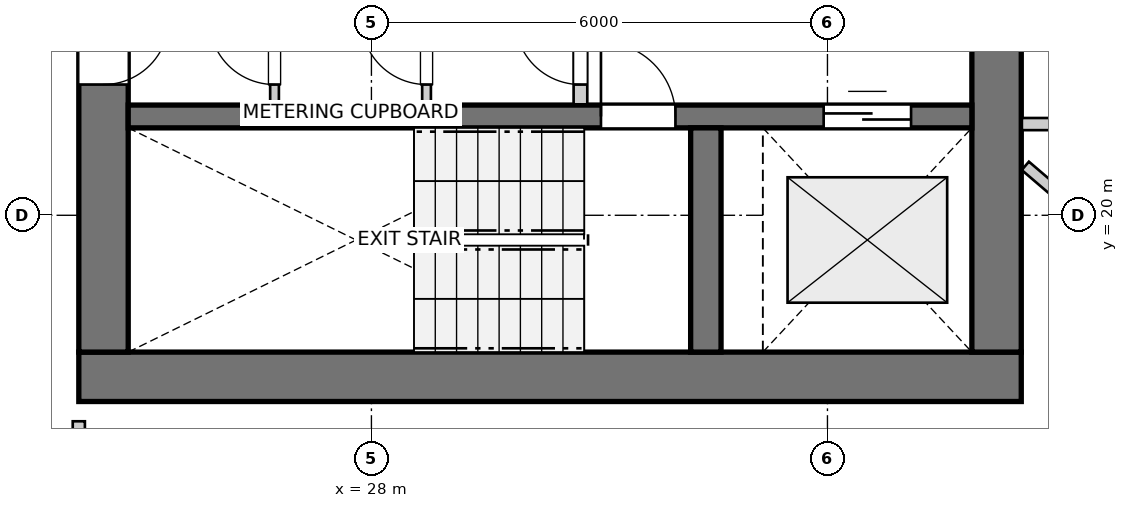
"""IFC4 building model, lengths in metres.
Left out: names, types, materials, properties, quantities, classifications, styles, units other than length and angle.
Written with IfcOpenShell. Run it as: python <this file> out.ifc"""

import sys

from ifc_helpers import new_model, si_unit, direction, frame, frame_2d, origin, place, context, subcontext, project, spatial, rectangle, extrude, source, transform, mapped, element, fill, save


model = new_model("IFC4")
c1 = context("Model", 3, precision=1e-05, world=origin(), true_north=direction((0.0, 1.0)))
c2 = subcontext(c1, "Body", "Model", "MODEL_VIEW")
j1 = project(units=[si_unit("LENGTHUNIT", "METRE"), si_unit("PLANEANGLEUNIT", "RADIAN")], contexts=[c1])
p1 = place(None, origin())
s1 = spatial("IfcSite", under=j1, at=p1, CompositionType="ELEMENT")
p2 = place(p1, origin())
s2 = spatial("IfcBuilding", under=s1, at=p2, CompositionType="ELEMENT")
p3 = place(p2, frame((0.0, 0.0, 187.4)))
s3 = spatial("IfcBuildingStorey", under=s2, at=p3, CompositionType="ELEMENT", Elevation=187.4)
p4 = place(p3, frame((24.15, 17.875, 0.0), z_axis=(0.0, 0.0, 1.0), x_axis=(1.0, 0.0, 0.0)))
e1 = element("IfcWall", 1, at=p4, inside=s3, PredefinedType="SHEAR", context=c2, shape_type="SweptSolid", body=[
    extrude(rectangle(XDim=12.4, YDim=0.65, at=frame_2d((6.2, 0.0))), origin(), (0.0, 0.0, 1.0), 2.9),
])
p5 = place(p3, frame((24.475, 33.8, 0.0), z_axis=(0.0, 0.0, 1.0), x_axis=(0.0, -1.0, 0.0)))
e2 = element("IfcWall", 2, at=p5, inside=s3, PredefinedType="SHEAR", context=c2, shape_type="SweptSolid", body=[
    extrude(rectangle(XDim=15.6, YDim=0.65, at=frame_2d((7.8, 0.0))), origin(), (0.0, 0.0, 1.0), 2.9),
])
p6 = place(p5, frame((7.05, 0.0, 0.0)))
e3 = element("IfcOpeningElement", 3, at=p6, cuts=e2, PredefinedType="OPENING", context=c2, shape_type="SweptSolid", body=[
    extrude(rectangle(XDim=1.5, YDim=2.15, at=frame_2d((0.75, 1.075))), frame((0.0, 0.335, 0.0), z_axis=(0.0, -1.0, 0.0), x_axis=(1.0, 0.0, 0.0)), (0.0, 0.0, 1.0), 0.67),
])
p7 = place(p5, frame((3.52, 0.0, 0.0)))
e4 = element("IfcOpeningElement", 4, at=p7, cuts=e2, PredefinedType="OPENING", context=c2, shape_type="SweptSolid", body=[
    extrude(rectangle(XDim=0.86, YDim=2.05, at=frame_2d((0.43, 1.025))), frame((0.0, 0.335, 0.0), z_axis=(0.0, -1.0, 0.0), x_axis=(1.0, 0.0, 0.0)), (0.0, 0.0, 1.0), 0.67),
])
p8 = place(p5, frame((11.22, 0.0, 0.0)))
e5 = element("IfcOpeningElement", 5, at=p8, cuts=e2, PredefinedType="OPENING", context=c2, shape_type="SweptSolid", body=[
    extrude(rectangle(XDim=0.86, YDim=2.05, at=frame_2d((0.43, 1.025))), frame((0.0, 0.335, 0.0), z_axis=(0.0, -1.0, 0.0), x_axis=(1.0, 0.0, 0.0)), (0.0, 0.0, 1.0), 0.67),
])
p9 = place(p3, frame((36.225, 18.2, 0.0), z_axis=(0.0, 0.0, 1.0), x_axis=(0.0, 1.0, 0.0)))
e6 = element("IfcWall", 6, at=p9, inside=s3, PredefinedType="SHEAR", context=c2, shape_type="SweptSolid", body=[
    extrude(rectangle(XDim=15.6, YDim=0.65, at=frame_2d((7.8, 0.0))), origin(), (0.0, 0.0, 1.0), 2.9),
])
p10 = place(p9, frame((4.25, 0.0, 0.0)))
e7 = element("IfcOpeningElement", 7, at=p10, cuts=e6, PredefinedType="OPENING", context=c2, shape_type="SweptSolid", body=[
    extrude(rectangle(XDim=1.1, YDim=2.15, at=frame_2d((0.55, 1.075))), frame((0.0, 0.335, 0.0), z_axis=(0.0, -1.0, 0.0), x_axis=(1.0, 0.0, 0.0)), (0.0, 0.0, 1.0), 0.67),
])
p11 = place(p9, frame((10.25, 0.0, 0.0)))
e8 = element("IfcOpeningElement", 8, at=p11, cuts=e6, PredefinedType="OPENING", context=c2, shape_type="SweptSolid", body=[
    extrude(rectangle(XDim=1.1, YDim=2.15, at=frame_2d((0.55, 1.075))), frame((0.0, 0.335, 0.0), z_axis=(0.0, -1.0, 0.0), x_axis=(1.0, 0.0, 0.0)), (0.0, 0.0, 1.0), 0.67),
])
p12 = place(p3, frame((24.8, 21.3, 0.0), z_axis=(0.0, 0.0, 1.0), x_axis=(1.0, 0.0, 0.0)))
e9 = element("IfcWall", 9, at=p12, inside=s3, PredefinedType="SHEAR", context=c2, shape_type="SweptSolid", body=[
    extrude(rectangle(XDim=11.1, YDim=0.3, at=frame_2d((5.55, 0.0))), origin(), (0.0, 0.0, 1.0), 2.9),
])
p13 = place(p12, frame((6.22, 0.0, 0.0)))
e10 = element("IfcOpeningElement", 10, at=p13, cuts=e9, PredefinedType="OPENING", context=c2, shape_type="SweptSolid", body=[
    extrude(rectangle(XDim=0.98, YDim=2.15, at=frame_2d((0.49, 1.075))), frame((0.0, 0.16, 0.0), z_axis=(0.0, -1.0, 0.0), x_axis=(1.0, 0.0, 0.0)), (0.0, 0.0, 1.0), 0.32),
])
p14 = place(p12, frame((9.15, 0.0, 0.0)))
e11 = element("IfcOpeningElement", 11, at=p14, cuts=e9, PredefinedType="OPENING", context=c2, shape_type="SweptSolid", body=[
    extrude(rectangle(XDim=1.15, YDim=2.15, at=frame_2d((0.575, 1.075))), frame((0.0, 0.16, 0.0), z_axis=(0.0, -1.0, 0.0), x_axis=(1.0, 0.0, 0.0)), (0.0, 0.0, 1.0), 0.32),
])
p15 = place(p3, frame((32.4, 18.2, 0.0), z_axis=(0.0, 0.0, 1.0), x_axis=(0.0, 1.0, 0.0)))
e12 = element("IfcWall", 12, at=p15, inside=s3, PredefinedType="SHEAR", context=c2, shape_type="SweptSolid", body=[
    extrude(rectangle(XDim=2.95, YDim=0.4, at=frame_2d((1.475, 0.0))), origin(), (0.0, 0.0, 1.0), 2.9),
])
p16 = place(p3, frame((30.75, 21.46, 0.0), z_axis=(0.0, 0.0, 1.0), x_axis=(0.0, 1.0, 0.0)))
e13 = element("IfcWall", 13, at=p16, inside=s3, PredefinedType="PARTITIONING", context=c2, shape_type="SweptSolid", body=[
    extrude(rectangle(XDim=3.11, YDim=0.18, at=frame_2d((1.555, 0.0))), origin(), (0.0, 0.0, 1.0), 2.9),
])
p17 = place(p16, frame((0.26, 0.0, 0.0)))
e14 = element("IfcOpeningElement", 14, at=p17, cuts=e13, PredefinedType="OPENING", context=c2, shape_type="SweptSolid", body=[
    extrude(rectangle(XDim=0.86, YDim=2.05, at=frame_2d((0.43, 1.025))), frame((0.0, 0.1, 0.0), z_axis=(0.0, -1.0, 0.0), x_axis=(1.0, 0.0, 0.0)), (0.0, 0.0, 1.0), 0.2),
])
p18 = place(p3, frame((26.725, 21.46, 0.0), z_axis=(0.0, 0.0, 1.0), x_axis=(0.0, 1.0, 0.0)))
e15 = element("IfcWall", 15, at=p18, inside=s3, PredefinedType="PARTITIONING", context=c2, shape_type="SweptSolid", body=[
    extrude(rectangle(XDim=1.38, YDim=0.115, at=frame_2d((0.69, 0.0))), origin(), (0.0, 0.0, 1.0), 2.9),
])
p19 = place(p18, frame((0.26, 0.0, 0.0)))
e16 = element("IfcOpeningElement", 16, at=p19, cuts=e15, PredefinedType="OPENING", context=c2, shape_type="SweptSolid", body=[
    extrude(rectangle(XDim=0.86, YDim=2.05, at=frame_2d((0.43, 1.025))), frame((0.0, 0.067, 0.0), z_axis=(0.0, -1.0, 0.0), x_axis=(1.0, 0.0, 0.0)), (0.0, 0.0, 1.0), 0.135),
])
p20 = place(p3, frame((28.725, 21.46, 0.0), z_axis=(0.0, 0.0, 1.0), x_axis=(0.0, 1.0, 0.0)))
e17 = element("IfcWall", 17, at=p20, inside=s3, PredefinedType="PARTITIONING", context=c2, shape_type="SweptSolid", body=[
    extrude(rectangle(XDim=1.38, YDim=0.115, at=frame_2d((0.69, 0.0))), origin(), (0.0, 0.0, 1.0), 2.9),
])
p21 = place(p20, frame((0.26, 0.0, 0.0)))
e18 = element("IfcOpeningElement", 18, at=p21, cuts=e17, PredefinedType="OPENING", context=c2, shape_type="SweptSolid", body=[
    extrude(rectangle(XDim=0.86, YDim=2.05, at=frame_2d((0.43, 1.025))), frame((0.0, 0.067, 0.0), z_axis=(0.0, -1.0, 0.0), x_axis=(1.0, 0.0, 0.0)), (0.0, 0.0, 1.0), 0.135),
])
p22 = place(p3, frame((24.15, 17.29, 0.0), z_axis=(0.0, 0.0, 1.0), x_axis=(0.0, -1.0, 0.0)))
e19 = element("IfcWall", 19, at=p22, inside=s3, PredefinedType="PARTITIONING", context=c2, shape_type="SweptSolid", body=[
    extrude(rectangle(XDim=3.593, YDim=0.16, at=frame_2d((1.796, 0.0))), origin(), (0.0, 0.0, 1.0), 2.9),
])
p23 = place(p22, frame((1.159, 0.0, 0.0)))
e20 = element("IfcOpeningElement", 20, at=p23, cuts=e19, PredefinedType="OPENING", context=c2, shape_type="SweptSolid", body=[
    extrude(rectangle(XDim=1.3, YDim=2.1, at=frame_2d((0.65, 1.05))), frame((0.0, 0.09, 0.0), z_axis=(0.0, -1.0, 0.0), x_axis=(1.0, 0.0, 0.0)), (0.0, 0.0, 1.0), 0.18),
])
p24 = place(p3, frame((38.33, 21.2, 0.0), z_axis=(0.0, 0.0, 1.0), x_axis=(-1.0, 0.0, 0.0)))
e21 = element("IfcWall", 21, at=p24, inside=s3, PredefinedType="PARTITIONING", context=c2, shape_type="SweptSolid", body=[
    extrude(rectangle(XDim=1.772, YDim=0.16, at=frame_2d((0.886, 0.0))), origin(), (0.0, 0.0, 1.0), 2.9),
])
p25 = place(p24, frame((0.41, 0.0, 0.0)))
e22 = element("IfcOpeningElement", 22, at=p25, cuts=e21, PredefinedType="OPENING", context=c2, shape_type="SweptSolid", body=[
    extrude(rectangle(XDim=0.96, YDim=2.1, at=frame_2d((0.48, 1.05))), frame((0.0, 0.09, 0.0), z_axis=(0.0, -1.0, 0.0), x_axis=(1.0, 0.0, 0.0)), (0.0, 0.0, 1.0), 0.18),
])
p26 = place(p3, frame((36.603, 20.65, 0.0), z_axis=(0.0, 0.0, 1.0), x_axis=(0.759924803985, -0.650010993975, 0.0)))
e23 = element("IfcWall", 23, at=p26, inside=s3, PredefinedType="PARTITIONING", context=c2, shape_type="SweptSolid", body=[
    extrude(rectangle(XDim=7.294, YDim=0.145, at=frame_2d((3.647, 0.0))), origin(), (0.0, 0.0, 1.0), 2.9),
])
m1 = source(origin(), c2, "Body", "SweptSolid", [
    extrude(rectangle(XDim=0.98, YDim=2.15, at=frame_2d((0.49, 1.075))), frame((0.0, 0.025, 0.0), z_axis=(0.0, -1.0, 0.0), x_axis=(1.0, 0.0, 0.0)), (0.0, 0.0, 1.0), 0.05),
])
p27 = place(p13, origin())
e24 = element("IfcDoor", 24, at=p27, inside=s3, OperationType="SINGLE_SWING_LEFT", PredefinedType="DOOR", context=c2, shape_type="MappedRepresentation", body=[
    mapped(m1, transform((0.0, 0.0, 0.0), x_axis=(1.0, 0.0, 0.0), y_axis=(0.0, 1.0, 0.0), z_axis=(0.0, 0.0, 1.0), scale=1.0)),
])
fill(e10, e24)
m2 = source(origin(), c2, "Body", "SweptSolid", [
    extrude(rectangle(XDim=1.15, YDim=2.15, at=frame_2d((0.575, 1.075))), frame((0.0, 0.025, 0.0), z_axis=(0.0, -1.0, 0.0), x_axis=(1.0, 0.0, 0.0)), (0.0, 0.0, 1.0), 0.05),
])
p28 = place(p14, origin())
e25 = element("IfcDoor", 25, at=p28, inside=s3, OperationType="DOUBLE_DOOR_SLIDING", PredefinedType="DOOR", context=c2, shape_type="MappedRepresentation", body=[
    mapped(m2, transform((0.0, 0.0, 0.0), x_axis=(1.0, 0.0, 0.0), y_axis=(0.0, 1.0, 0.0), z_axis=(0.0, 0.0, 1.0), scale=1.0)),
])
fill(e11, e25)
m3 = source(origin(), c2, "Body", "SweptSolid", [
    extrude(rectangle(XDim=0.86, YDim=2.05, at=frame_2d((0.43, 1.025))), frame((0.0, 0.025, 0.0), z_axis=(0.0, -1.0, 0.0), x_axis=(1.0, 0.0, 0.0)), (0.0, 0.0, 1.0), 0.05),
])
p29 = place(p8, origin())
e26 = element("IfcDoor", 26, at=p29, inside=s3, OperationType="SINGLE_SWING_LEFT", PredefinedType="DOOR", context=c2, shape_type="MappedRepresentation", body=[
    mapped(m3, transform((0.0, 0.0, 0.0), x_axis=(1.0, 0.0, 0.0), y_axis=(0.0, 1.0, 0.0), z_axis=(0.0, 0.0, 1.0), scale=1.0)),
])
fill(e5, e26)
p30 = place(p17, origin())
e27 = element("IfcDoor", 27, at=p30, inside=s3, OperationType="SINGLE_SWING_RIGHT", PredefinedType="DOOR", context=c2, shape_type="MappedRepresentation", body=[
    mapped(m3, transform((0.0, 0.0, 0.0), x_axis=(1.0, 0.0, 0.0), y_axis=(0.0, 1.0, 0.0), z_axis=(0.0, 0.0, 1.0), scale=1.0)),
])
fill(e14, e27)
p31 = place(p19, origin())
e28 = element("IfcDoor", 28, at=p31, inside=s3, OperationType="SINGLE_SWING_RIGHT", PredefinedType="DOOR", context=c2, shape_type="MappedRepresentation", body=[
    mapped(m3, transform((0.0, 0.0, 0.0), x_axis=(1.0, 0.0, 0.0), y_axis=(0.0, 1.0, 0.0), z_axis=(0.0, 0.0, 1.0), scale=1.0)),
])
fill(e16, e28)
p32 = place(p21, origin())
e29 = element("IfcDoor", 29, at=p32, inside=s3, OperationType="SINGLE_SWING_RIGHT", PredefinedType="DOOR", context=c2, shape_type="MappedRepresentation", body=[
    mapped(m3, transform((0.0, 0.0, 0.0), x_axis=(1.0, 0.0, 0.0), y_axis=(0.0, 1.0, 0.0), z_axis=(0.0, 0.0, 1.0), scale=1.0)),
])
fill(e18, e29)
save(model, sys.argv[1])
